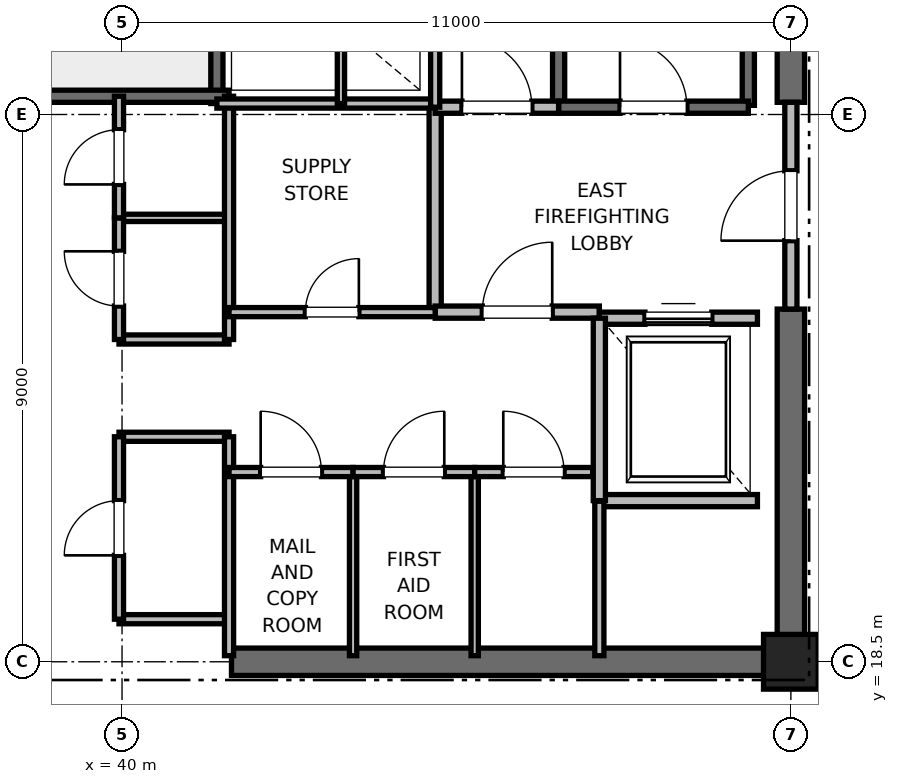
"""IFC4 building model, lengths in metres.
Left out: names, types, materials, properties, quantities, classifications, styles, units other than length and angle.
Written with IfcOpenShell. Run it as: python <this file> out.ifc"""

import sys

from ifc_helpers import new_model, si_unit, direction, frame, frame_2d, origin, origin_2d, place, context, subcontext, project, spatial, rectangle, extrude, element, fill, save


model = new_model("IFC4")
c1 = context("Model", 3, precision=1e-05, world=origin(), true_north=direction((0.0, 1.0)))
c2 = subcontext(c1, "Body", "Model", "MODEL_VIEW")
j1 = project(units=[si_unit("LENGTHUNIT", "METRE"), si_unit("PLANEANGLEUNIT", "RADIAN")], contexts=[c1])
p1 = place(None, origin())
s1 = spatial("IfcSite", under=j1, at=p1, CompositionType="ELEMENT")
p2 = place(p1, origin())
s2 = spatial("IfcBuilding", under=s1, at=p2, CompositionType="ELEMENT")
p3 = place(p2, frame((0.0, 0.0, 271.2)))
s3 = spatial("IfcBuildingStorey", under=s2, at=p3, CompositionType="ELEMENT", Elevation=271.2)
p4 = place(p3, frame((51.0, 18.5, 0.0), z_axis=(0.0, 0.0, 1.0), x_axis=(1.0, 0.0, 0.0)))
e1 = element("IfcColumn", 1, at=p4, inside=s3, PredefinedType="PILASTER", context=c2, shape_type="SweptSolid", body=[
    extrude(rectangle(XDim=0.9, YDim=0.9, at=origin_2d()), origin(), (0.0, 0.0, 1.0), 4.0),
])
p5 = place(p3, frame((41.8, 18.5, 0.0), z_axis=(0.0, 0.0, 1.0), x_axis=(1.0, 0.0, 0.0)))
e2 = element("IfcWall", 2, at=p5, inside=s3, PredefinedType="SHEAR", context=c2, shape_type="SweptSolid", body=[
    extrude(rectangle(XDim=9.2, YDim=0.45, at=frame_2d((4.6, 0.0))), origin(), (0.0, 0.0, 1.0), 3.785),
])
p6 = place(p3, frame((51.0, 18.5, 0.0), z_axis=(0.0, 0.0, 1.0), x_axis=(0.0, 1.0, 0.0)))
e3 = element("IfcWall", 3, at=p6, inside=s3, PredefinedType="SHEAR", context=c2, shape_type="SweptSolid", body=[
    extrude(rectangle(XDim=5.8, YDim=0.45, at=frame_2d((2.9, 0.0))), origin(), (0.0, 0.0, 1.0), 3.785),
])
p7 = place(p3, frame((51.0, 27.7, 0.0), z_axis=(0.0, 0.0, 1.0), x_axis=(0.0, 1.0, 0.0)))
e4 = element("IfcWall", 4, at=p7, inside=s3, PredefinedType="SHEAR", context=c2, shape_type="SweptSolid", body=[
    extrude(rectangle(XDim=8.8, YDim=0.45, at=frame_2d((4.4, 0.0))), origin(), (0.0, 0.0, 1.0), 3.785),
])
p8 = place(p3, frame((50.3, 27.65, 0.0), z_axis=(0.0, 0.0, 1.0), x_axis=(0.0, 1.0, 0.0)))
e5 = element("IfcWall", 5, at=p8, inside=s3, PredefinedType="SOLIDWALL", context=c2, shape_type="SweptSolid", body=[
    extrude(rectangle(XDim=8.15, YDim=0.2, at=frame_2d((4.075, 0.0))), origin(), (0.0, 0.0, 1.0), 3.785),
])
p9 = place(p3, frame((47.18, 27.62, 0.0), z_axis=(0.0, 0.0, 1.0), x_axis=(0.0, 1.0, 0.0)))
e6 = element("IfcWall", 6, at=p9, inside=s3, PredefinedType="SOLIDWALL", context=c2, shape_type="SweptSolid", body=[
    extrude(rectangle(XDim=8.18, YDim=0.2, at=frame_2d((4.09, 0.0))), origin(), (0.0, 0.0, 1.0), 3.785),
])
p10 = place(p3, frame((47.18, 27.62, 0.0), z_axis=(0.0, 0.0, 1.0), x_axis=(1.0, 0.0, 0.0)))
e7 = element("IfcWall", 7, at=p10, inside=s3, PredefinedType="SOLIDWALL", context=c2, shape_type="SweptSolid", body=[
    extrude(rectangle(XDim=3.12, YDim=0.2, at=frame_2d((1.56, 0.0))), origin(), (0.0, 0.0, 1.0), 3.785),
])
p11 = place(p10, frame((1.01, 0.0, 0.0)))
e8 = element("IfcOpeningElement", 8, at=p11, cuts=e7, PredefinedType="OPENING", context=c2, shape_type="SweptSolid", body=[
    extrude(rectangle(XDim=1.1, YDim=2.15, at=frame_2d((0.55, 1.075))), frame((0.0, 0.1, 0.0), z_axis=(0.0, -1.0, 0.0), x_axis=(1.0, 0.0, 0.0)), (0.0, 0.0, 1.0), 0.2),
])
p12 = place(p3, frame((41.56, 27.68, 0.0), z_axis=(0.0, 0.0, 1.0), x_axis=(0.0, 1.0, 0.0)))
e9 = element("IfcWall", 9, at=p12, inside=s3, PredefinedType="SOLIDWALL", context=c2, shape_type="SweptSolid", body=[
    extrude(rectangle(XDim=8.57, YDim=0.2, at=frame_2d((4.285, 0.0))), origin(), (0.0, 0.0, 1.0), 3.785),
])
p13 = place(p3, frame((38.44, 27.8, 0.0), z_axis=(0.0, 0.0, 1.0), x_axis=(1.0, 0.0, 0.0)))
e10 = element("IfcWall", 10, at=p13, inside=s3, PredefinedType="SOLIDWALL", context=c2, shape_type="SweptSolid", body=[
    extrude(rectangle(XDim=3.32, YDim=0.2, at=frame_2d((1.66, 0.0))), origin(), (0.0, 0.0, 1.0), 3.785),
])
p14 = place(p3, frame((45.15, 24.25, 0.0), z_axis=(0.0, 0.0, 1.0), x_axis=(0.0, 1.0, 0.0)))
e11 = element("IfcWall", 11, at=p14, inside=s3, PredefinedType="PARTITIONING", context=c2, shape_type="SweptSolid", body=[
    extrude(rectangle(XDim=3.37, YDim=0.2, at=frame_2d((1.685, 0.0))), origin(), (0.0, 0.0, 1.0), 3.785),
])
p15 = place(p3, frame((45.15, 24.25, 0.0), z_axis=(0.0, 0.0, 1.0), x_axis=(1.0, 0.0, 0.0)))
e12 = element("IfcWall", 12, at=p15, inside=s3, PredefinedType="PARTITIONING", context=c2, shape_type="SweptSolid", body=[
    extrude(rectangle(XDim=2.7, YDim=0.2, at=frame_2d((1.35, 0.0))), origin(), (0.0, 0.0, 1.0), 3.785),
])
p16 = place(p15, frame((0.775, 0.0, 0.0)))
e13 = element("IfcOpeningElement", 13, at=p16, cuts=e12, PredefinedType="OPENING", context=c2, shape_type="SweptSolid", body=[
    extrude(rectangle(XDim=1.15, YDim=2.2, at=frame_2d((0.575, 1.1))), frame((0.0, 0.1, 0.0), z_axis=(0.0, -1.0, 0.0), x_axis=(1.0, 0.0, 0.0)), (0.0, 0.0, 1.0), 0.2),
])
p17 = place(p3, frame((45.15, 27.62, 0.0), z_axis=(0.0, 0.0, 1.0), x_axis=(1.0, 0.0, 0.0)))
e14 = element("IfcWall", 14, at=p17, inside=s3, PredefinedType="PARTITIONING", context=c2, shape_type="SweptSolid", body=[
    extrude(rectangle(XDim=2.03, YDim=0.2, at=frame_2d((1.015, 0.0))), origin(), (0.0, 0.0, 1.0), 3.785),
])
p18 = place(p17, frame((0.44, 0.0, 0.0)))
e15 = element("IfcOpeningElement", 15, at=p18, cuts=e14, PredefinedType="OPENING", context=c2, shape_type="SweptSolid", body=[
    extrude(rectangle(XDim=1.15, YDim=2.2, at=frame_2d((0.575, 1.1))), frame((0.0, 0.1, 0.0), z_axis=(0.0, -1.0, 0.0), x_axis=(1.0, 0.0, 0.0)), (0.0, 0.0, 1.0), 0.2),
])
p19 = place(p3, frame((51.0, 24.3, 0.0), z_axis=(0.0, 0.0, 1.0), x_axis=(0.0, 1.0, 0.0)))
e16 = element("IfcWall", 16, at=p19, inside=s3, PredefinedType="PARTITIONING", context=c2, shape_type="SweptSolid", body=[
    extrude(rectangle(XDim=3.4, YDim=0.2, at=frame_2d((1.7, 0.0))), origin(), (0.0, 0.0, 1.0), 2.865),
])
p20 = place(p19, frame((1.125, 0.0, 0.0)))
e17 = element("IfcOpeningElement", 17, at=p20, cuts=e16, PredefinedType="OPENING", context=c2, shape_type="SweptSolid", body=[
    extrude(rectangle(XDim=1.15, YDim=2.2, at=frame_2d((0.575, 1.1))), frame((0.0, 0.1, 0.0), z_axis=(0.0, -1.0, 0.0), x_axis=(1.0, 0.0, 0.0)), (0.0, 0.0, 1.0), 0.2),
])
p21 = place(p3, frame((47.85, 21.15, 0.0), z_axis=(0.0, 0.0, 1.0), x_axis=(1.0, 0.0, 0.0)))
e18 = element("IfcWall", 18, at=p21, inside=s3, PredefinedType="SOLIDWALL", context=c2, shape_type="SweptSolid", body=[
    extrude(rectangle(XDim=2.6, YDim=0.2, at=frame_2d((1.3, 0.0))), origin(), (0.0, 0.0, 1.0), 3.785),
])
p22 = place(p3, frame((50.45, 24.15, 0.0), z_axis=(0.0, 0.0, 1.0), x_axis=(-1.0, 0.0, 0.0)))
e19 = element("IfcWall", 19, at=p22, inside=s3, PredefinedType="SOLIDWALL", context=c2, shape_type="SweptSolid", body=[
    extrude(rectangle(XDim=2.6, YDim=0.2, at=frame_2d((1.3, 0.0))), origin(), (0.0, 0.0, 1.0), 2.865),
])
p23 = place(p22, frame((0.75, 0.0, 0.0)))
e20 = element("IfcOpeningElement", 20, at=p23, cuts=e19, PredefinedType="OPENING", context=c2, shape_type="SweptSolid", body=[
    extrude(rectangle(XDim=1.1, YDim=2.2, at=frame_2d((0.55, 1.1))), frame((0.0, 0.1, 0.0), z_axis=(0.0, -1.0, 0.0), x_axis=(1.0, 0.0, 0.0)), (0.0, 0.0, 1.0), 0.2),
])
p24 = place(p3, frame((47.85, 24.15, 0.0), z_axis=(0.0, 0.0, 1.0), x_axis=(0.0, -1.0, 0.0)))
e21 = element("IfcWall", 21, at=p24, inside=s3, PredefinedType="SOLIDWALL", context=c2, shape_type="SweptSolid", body=[
    extrude(rectangle(XDim=3.0, YDim=0.2, at=frame_2d((1.5, 0.0))), origin(), (0.0, 0.0, 1.0), 3.785),
])
for number, where, z_axis, x_axis in (
    (22, (39.95, 19.2, 0.0), (0.0, 0.0, 1.0), (1.0, 0.0, 0.0)),
    (23, (39.95, 22.2, 0.0), (0.0, 0.0, 1.0), (1.0, 0.0, 0.0)),
    (24, (39.95, 23.8, 0.0), (0.0, 0.0, 1.0), (1.0, 0.0, 0.0)),
):
    element("IfcWall", number, at=place(p3, frame(where, z_axis=z_axis, x_axis=x_axis)), inside=s3, PredefinedType="PARTITIONING", context=c2, shape_type="SweptSolid", body=[
        extrude(rectangle(XDim=1.81, YDim=0.15, at=frame_2d((0.905, 0.0))), origin(), (0.0, 0.0, 1.0), 2.85),
    ])
p25 = place(p3, frame((39.95, 25.8, 0.0), z_axis=(0.0, 0.0, 1.0), x_axis=(1.0, 0.0, 0.0)))
e25 = element("IfcWall", 25, at=p25, inside=s3, PredefinedType="PARTITIONING", context=c2, shape_type="SweptSolid", body=[
    extrude(rectangle(XDim=1.81, YDim=0.12, at=frame_2d((0.905, 0.0))), origin(), (0.0, 0.0, 1.0), 2.85),
])
p26 = place(p3, frame((41.76, 18.6, 0.0), z_axis=(0.0, 0.0, 1.0), x_axis=(0.0, 1.0, 0.0)))
e26 = element("IfcWall", 26, at=p26, inside=s3, PredefinedType="PARTITIONING", context=c2, shape_type="SweptSolid", body=[
    extrude(rectangle(XDim=3.6, YDim=0.15, at=frame_2d((1.8, 0.0))), origin(), (0.0, 0.0, 1.0), 2.85),
])
p27 = place(p3, frame((41.76, 23.8, 0.0), z_axis=(0.0, 0.0, 1.0), x_axis=(0.0, 1.0, 0.0)))
e27 = element("IfcWall", 27, at=p27, inside=s3, PredefinedType="PARTITIONING", context=c2, shape_type="SweptSolid", body=[
    extrude(rectangle(XDim=4.0, YDim=0.15, at=frame_2d((2.0, 0.0))), origin(), (0.0, 0.0, 1.0), 2.85),
])
p28 = place(p3, frame((39.95, 19.2, 0.0), z_axis=(0.0, 0.0, 1.0), x_axis=(0.0, 1.0, 0.0)))
e28 = element("IfcWall", 28, at=p28, inside=s3, PredefinedType="PARTITIONING", context=c2, shape_type="SweptSolid", body=[
    extrude(rectangle(XDim=3.0, YDim=0.15, at=frame_2d((1.5, 0.0))), origin(), (0.0, 0.0, 1.0), 2.85),
])
p29 = place(p28, frame((1.05, 0.0, 0.0)))
e29 = element("IfcOpeningElement", 29, at=p29, cuts=e28, PredefinedType="OPENING", context=c2, shape_type="SweptSolid", body=[
    extrude(rectangle(XDim=0.9, YDim=2.1, at=frame_2d((0.45, 1.05))), frame((0.0, 0.075, 0.0), z_axis=(0.0, -1.0, 0.0), x_axis=(1.0, 0.0, 0.0)), (0.0, 0.0, 1.0), 0.15),
])
p30 = place(p3, frame((39.95, 23.8, 0.0), z_axis=(0.0, 0.0, 1.0), x_axis=(0.0, 1.0, 0.0)))
e30 = element("IfcWall", 30, at=p30, inside=s3, PredefinedType="PARTITIONING", context=c2, shape_type="SweptSolid", body=[
    extrude(rectangle(XDim=2.0, YDim=0.15, at=frame_2d((1.0, 0.0))), origin(), (0.0, 0.0, 1.0), 2.85),
])
p31 = place(p30, frame((0.55, 0.0, 0.0)))
e31 = element("IfcOpeningElement", 31, at=p31, cuts=e30, PredefinedType="OPENING", context=c2, shape_type="SweptSolid", body=[
    extrude(rectangle(XDim=0.9, YDim=2.1, at=frame_2d((0.45, 1.05))), frame((0.0, 0.075, 0.0), z_axis=(0.0, -1.0, 0.0), x_axis=(1.0, 0.0, 0.0)), (0.0, 0.0, 1.0), 0.15),
])
p32 = place(p3, frame((39.95, 25.8, 0.0), z_axis=(0.0, 0.0, 1.0), x_axis=(0.0, 1.0, 0.0)))
e32 = element("IfcWall", 32, at=p32, inside=s3, PredefinedType="PARTITIONING", context=c2, shape_type="SweptSolid", body=[
    extrude(rectangle(XDim=2.0, YDim=0.15, at=frame_2d((1.0, 0.0))), origin(), (0.0, 0.0, 1.0), 2.85),
])
p33 = place(p32, frame((0.55, 0.0, 0.0)))
e33 = element("IfcOpeningElement", 33, at=p33, cuts=e32, PredefinedType="OPENING", context=c2, shape_type="SweptSolid", body=[
    extrude(rectangle(XDim=0.9, YDim=2.1, at=frame_2d((0.45, 1.05))), frame((0.0, 0.075, 0.0), z_axis=(0.0, -1.0, 0.0), x_axis=(1.0, 0.0, 0.0)), (0.0, 0.0, 1.0), 0.15),
])
p34 = place(p3, frame((41.56, 27.68, 0.0), z_axis=(0.0, 0.0, 1.0), x_axis=(1.0, 0.0, 0.0)))
e34 = element("IfcWall", 34, at=p34, inside=s3, PredefinedType="PARTITIONING", context=c2, shape_type="SweptSolid", body=[
    extrude(rectangle(XDim=3.59, YDim=0.15, at=frame_2d((1.795, 0.0))), origin(), (0.0, 0.0, 1.0), 2.85),
])
p35 = place(p3, frame((47.85, 18.6, 0.0), z_axis=(0.0, 0.0, 1.0), x_axis=(0.0, 1.0, 0.0)))
e35 = element("IfcWall", 35, at=p35, inside=s3, PredefinedType="PARTITIONING", context=c2, shape_type="SweptSolid", body=[
    extrude(rectangle(XDim=2.54, YDim=0.15, at=frame_2d((1.27, 0.0))), origin(), (0.0, 0.0, 1.0), 2.85),
])
for number, where, z_axis, x_axis in (
    (36, (43.8, 18.6, 0.0), (0.0, 0.0, 1.0), (0.0, 1.0, 0.0)),
    (37, (45.8, 18.6, 0.0), (0.0, 0.0, 1.0), (0.0, 1.0, 0.0)),
):
    element("IfcWall", number, at=place(p3, frame(where, z_axis=z_axis, x_axis=x_axis)), inside=s3, PredefinedType="PARTITIONING", context=c2, shape_type="SweptSolid", body=[
        extrude(rectangle(XDim=3.02, YDim=0.12, at=frame_2d((1.51, 0.0))), origin(), (0.0, 0.0, 1.0), 2.85),
    ])
p36 = place(p3, frame((41.76, 21.62, 0.0), z_axis=(0.0, 0.0, 1.0), x_axis=(1.0, 0.0, 0.0)))
e38 = element("IfcWall", 38, at=p36, inside=s3, PredefinedType="PARTITIONING", context=c2, shape_type="SweptSolid", body=[
    extrude(rectangle(XDim=2.04, YDim=0.15, at=frame_2d((1.02, 0.0))), origin(), (0.0, 0.0, 1.0), 2.85),
])
p37 = place(p36, frame((0.52, 0.0, 0.0)))
e39 = element("IfcOpeningElement", 39, at=p37, cuts=e38, PredefinedType="OPENING", context=c2, shape_type="SweptSolid", body=[
    extrude(rectangle(XDim=1.0, YDim=2.15, at=frame_2d((0.5, 1.075))), frame((0.0, 0.075, 0.0), z_axis=(0.0, -1.0, 0.0), x_axis=(1.0, 0.0, 0.0)), (0.0, 0.0, 1.0), 0.15),
])
p38 = place(p3, frame((43.8, 21.62, 0.0), z_axis=(0.0, 0.0, 1.0), x_axis=(1.0, 0.0, 0.0)))
e40 = element("IfcWall", 40, at=p38, inside=s3, PredefinedType="PARTITIONING", context=c2, shape_type="SweptSolid", body=[
    extrude(rectangle(XDim=2.0, YDim=0.15, at=frame_2d((1.0, 0.0))), origin(), (0.0, 0.0, 1.0), 2.85),
])
p39 = place(p38, frame((0.5, 0.0, 0.0)))
e41 = element("IfcOpeningElement", 41, at=p39, cuts=e40, PredefinedType="OPENING", context=c2, shape_type="SweptSolid", body=[
    extrude(rectangle(XDim=1.0, YDim=2.15, at=frame_2d((0.5, 1.075))), frame((0.0, 0.075, 0.0), z_axis=(0.0, -1.0, 0.0), x_axis=(1.0, 0.0, 0.0)), (0.0, 0.0, 1.0), 0.15),
])
p40 = place(p3, frame((45.8, 21.62, 0.0), z_axis=(0.0, 0.0, 1.0), x_axis=(1.0, 0.0, 0.0)))
e42 = element("IfcWall", 42, at=p40, inside=s3, PredefinedType="PARTITIONING", context=c2, shape_type="SweptSolid", body=[
    extrude(rectangle(XDim=1.94, YDim=0.15, at=frame_2d((0.97, 0.0))), origin(), (0.0, 0.0, 1.0), 2.85),
])
p41 = place(p40, frame((0.47, 0.0, 0.0)))
e43 = element("IfcOpeningElement", 43, at=p41, cuts=e42, PredefinedType="OPENING", context=c2, shape_type="SweptSolid", body=[
    extrude(rectangle(XDim=1.0, YDim=2.15, at=frame_2d((0.5, 1.075))), frame((0.0, 0.075, 0.0), z_axis=(0.0, -1.0, 0.0), x_axis=(1.0, 0.0, 0.0)), (0.0, 0.0, 1.0), 0.15),
])
p42 = place(p3, frame((41.76, 24.25, 0.0), z_axis=(0.0, 0.0, 1.0), x_axis=(1.0, 0.0, 0.0)))
e44 = element("IfcWall", 44, at=p42, inside=s3, PredefinedType="PARTITIONING", context=c2, shape_type="SweptSolid", body=[
    extrude(rectangle(XDim=3.39, YDim=0.15, at=frame_2d((1.695, 0.0))), origin(), (0.0, 0.0, 1.0), 2.85),
])
p43 = place(p42, frame((1.255, 0.0, 0.0)))
e45 = element("IfcOpeningElement", 45, at=p43, cuts=e44, PredefinedType="OPENING", context=c2, shape_type="SweptSolid", body=[
    extrude(rectangle(XDim=0.88, YDim=2.1, at=frame_2d((0.44, 1.05))), frame((0.0, 0.075, 0.0), z_axis=(0.0, -1.0, 0.0), x_axis=(1.0, 0.0, 0.0)), (0.0, 0.0, 1.0), 0.15),
])
p44 = place(p3, frame((45.15, 27.62, 0.0), z_axis=(0.0, 0.0, 1.0), x_axis=(0.0, 1.0, 0.0)))
e46 = element("IfcWall", 46, at=p44, inside=s3, PredefinedType="PARTITIONING", context=c2, shape_type="SweptSolid", body=[
    extrude(rectangle(XDim=3.1, YDim=0.15, at=frame_2d((1.55, 0.0))), origin(), (0.0, 0.0, 1.0), 2.85),
])
p45 = place(p3, frame((43.6, 27.68, 0.0), z_axis=(0.0, 0.0, 1.0), x_axis=(0.0, 1.0, 0.0)))
e47 = element("IfcWall", 47, at=p45, inside=s3, PredefinedType="PARTITIONING", context=c2, shape_type="SweptSolid", body=[
    extrude(rectangle(XDim=3.04, YDim=0.12, at=frame_2d((1.52, 0.0))), origin(), (0.0, 0.0, 1.0), 2.85),
])
p46 = place(p11, origin())
e48 = element("IfcDoor", 48, at=p46, inside=s3, OperationType="SINGLE_SWING_LEFT", PredefinedType="DOOR", context=c2, shape_type="SweptSolid", body=[
    extrude(rectangle(XDim=1.1, YDim=2.15, at=frame_2d((0.55, 1.075))), frame((0.0, 0.025, 0.0), z_axis=(0.0, -1.0, 0.0), x_axis=(1.0, 0.0, 0.0)), (0.0, 0.0, 1.0), 0.05),
])
fill(e8, e48)
p47 = place(p16, origin())
e49 = element("IfcDoor", 49, at=p47, inside=s3, OperationType="SINGLE_SWING_RIGHT", PredefinedType="DOOR", context=c2, shape_type="SweptSolid", body=[
    extrude(rectangle(XDim=1.15, YDim=2.2, at=frame_2d((0.575, 1.1))), frame((0.0, 0.025, 0.0), z_axis=(0.0, -1.0, 0.0), x_axis=(1.0, 0.0, 0.0)), (0.0, 0.0, 1.0), 0.05),
])
fill(e13, e49)
p48 = place(p18, origin())
e50 = element("IfcDoor", 50, at=p48, inside=s3, OperationType="SINGLE_SWING_LEFT", PredefinedType="DOOR", context=c2, shape_type="SweptSolid", body=[
    extrude(rectangle(XDim=1.15, YDim=2.2, at=frame_2d((0.575, 1.1))), frame((0.0, 0.025, 0.0), z_axis=(0.0, -1.0, 0.0), x_axis=(1.0, 0.0, 0.0)), (0.0, 0.0, 1.0), 0.05),
])
fill(e15, e50)
p49 = place(p20, origin())
e51 = element("IfcDoor", 51, at=p49, inside=s3, OperationType="SINGLE_SWING_LEFT", PredefinedType="DOOR", context=c2, shape_type="SweptSolid", body=[
    extrude(rectangle(XDim=1.15, YDim=2.2, at=frame_2d((0.575, 1.1))), frame((0.0, 0.025, 0.0), z_axis=(0.0, -1.0, 0.0), x_axis=(1.0, 0.0, 0.0)), (0.0, 0.0, 1.0), 0.05),
])
fill(e17, e51)
p50 = place(p23, origin())
e52 = element("IfcDoor", 52, at=p50, inside=s3, OperationType="SLIDING_TO_RIGHT", PredefinedType="DOOR", context=c2, shape_type="SweptSolid", body=[
    extrude(rectangle(XDim=1.1, YDim=2.2, at=frame_2d((0.55, 1.1))), frame((0.0, 0.025, 0.0), z_axis=(0.0, -1.0, 0.0), x_axis=(1.0, 0.0, 0.0)), (0.0, 0.0, 1.0), 0.05),
])
fill(e20, e52)
p51 = place(p29, origin())
e53 = element("IfcDoor", 53, at=p51, inside=s3, OperationType="SINGLE_SWING_LEFT", PredefinedType="DOOR", context=c2, shape_type="SweptSolid", body=[
    extrude(rectangle(XDim=0.9, YDim=2.1, at=frame_2d((0.45, 1.05))), frame((0.0, 0.025, 0.0), z_axis=(0.0, -1.0, 0.0), x_axis=(1.0, 0.0, 0.0)), (0.0, 0.0, 1.0), 0.05),
])
fill(e29, e53)
p52 = place(p31, origin())
e54 = element("IfcDoor", 54, at=p52, inside=s3, OperationType="SINGLE_SWING_RIGHT", PredefinedType="DOOR", context=c2, shape_type="SweptSolid", body=[
    extrude(rectangle(XDim=0.9, YDim=2.1, at=frame_2d((0.45, 1.05))), frame((0.0, 0.025, 0.0), z_axis=(0.0, -1.0, 0.0), x_axis=(1.0, 0.0, 0.0)), (0.0, 0.0, 1.0), 0.05),
])
fill(e31, e54)
p53 = place(p33, origin())
e55 = element("IfcDoor", 55, at=p53, inside=s3, OperationType="SINGLE_SWING_LEFT", PredefinedType="DOOR", context=c2, shape_type="SweptSolid", body=[
    extrude(rectangle(XDim=0.9, YDim=2.1, at=frame_2d((0.45, 1.05))), frame((0.0, 0.025, 0.0), z_axis=(0.0, -1.0, 0.0), x_axis=(1.0, 0.0, 0.0)), (0.0, 0.0, 1.0), 0.05),
])
fill(e33, e55)
p54 = place(p37, origin())
e56 = element("IfcDoor", 56, at=p54, inside=s3, OperationType="SINGLE_SWING_LEFT", PredefinedType="DOOR", context=c2, shape_type="SweptSolid", body=[
    extrude(rectangle(XDim=1.0, YDim=2.15, at=frame_2d((0.5, 1.075))), frame((0.0, 0.025, 0.0), z_axis=(0.0, -1.0, 0.0), x_axis=(1.0, 0.0, 0.0)), (0.0, 0.0, 1.0), 0.05),
])
fill(e39, e56)
p55 = place(p39, origin())
e57 = element("IfcDoor", 57, at=p55, inside=s3, OperationType="SINGLE_SWING_RIGHT", PredefinedType="DOOR", context=c2, shape_type="SweptSolid", body=[
    extrude(rectangle(XDim=1.0, YDim=2.15, at=frame_2d((0.5, 1.075))), frame((0.0, 0.025, 0.0), z_axis=(0.0, -1.0, 0.0), x_axis=(1.0, 0.0, 0.0)), (0.0, 0.0, 1.0), 0.05),
])
fill(e41, e57)
p56 = place(p41, origin())
e58 = element("IfcDoor", 58, at=p56, inside=s3, OperationType="SINGLE_SWING_LEFT", PredefinedType="DOOR", context=c2, shape_type="SweptSolid", body=[
    extrude(rectangle(XDim=1.0, YDim=2.15, at=frame_2d((0.5, 1.075))), frame((0.0, 0.025, 0.0), z_axis=(0.0, -1.0, 0.0), x_axis=(1.0, 0.0, 0.0)), (0.0, 0.0, 1.0), 0.05),
])
fill(e43, e58)
p57 = place(p43, origin())
e59 = element("IfcDoor", 59, at=p57, inside=s3, OperationType="SINGLE_SWING_RIGHT", PredefinedType="DOOR", context=c2, shape_type="SweptSolid", body=[
    extrude(rectangle(XDim=0.88, YDim=2.1, at=frame_2d((0.44, 1.05))), frame((0.0, 0.025, 0.0), z_axis=(0.0, -1.0, 0.0), x_axis=(1.0, 0.0, 0.0)), (0.0, 0.0, 1.0), 0.05),
])
fill(e45, e59)
save(model, sys.argv[1])
